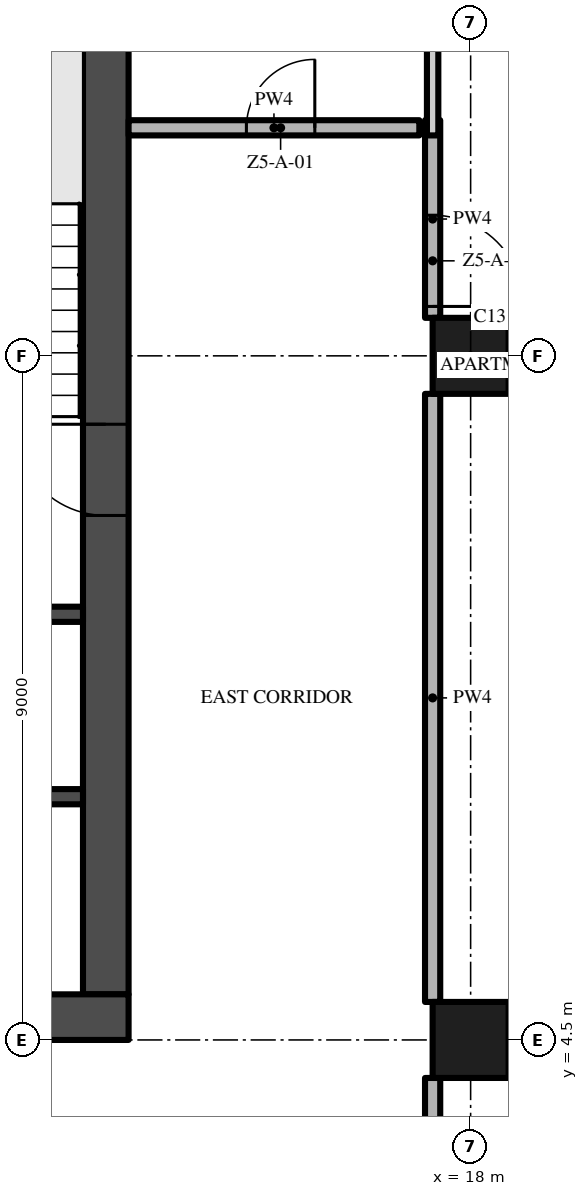
"""IFC4 building model, lengths in metres.
Left out: names, types, materials, properties, quantities, classifications, styles, units other than length and angle.
Written with IfcOpenShell. Run it as: python <this file> out.ifc"""

import sys

from ifc_helpers import new_model, si_unit, direction, frame, frame_2d, origin, origin_2d, place, context, subcontext, project, spatial, rectangle, extrude, element, fill, save


model = new_model("IFC4")
c1 = context("Model", 3, precision=1e-05, world=origin(), true_north=direction((0.0, 1.0)))
c2 = subcontext(c1, "Body", "Model", "MODEL_VIEW")
j1 = project(units=[si_unit("LENGTHUNIT", "METRE"), si_unit("PLANEANGLEUNIT", "RADIAN")], contexts=[c1])
p1 = place(None, origin())
s1 = spatial("IfcSite", under=j1, at=p1, CompositionType="ELEMENT")
p2 = place(p1, origin())
s2 = spatial("IfcBuilding", under=s1, at=p2, CompositionType="ELEMENT")
p3 = place(p2, frame((0.0, 0.0, 246.4)))
s3 = spatial("IfcBuildingStorey", under=s2, at=p3, CompositionType="ELEMENT", Elevation=246.4)
p4 = place(p3, frame((-13.5, 4.8, -0.3), z_axis=(0.0, 0.0, 1.0), x_axis=(1.0, 0.0, 0.0)))
e1 = element("IfcWall", 1, at=p4, inside=s3, PredefinedType="SHEAR", context=c2, shape_type="SweptSolid", body=[
    extrude(rectangle(XDim=27.0, YDim=0.6, at=frame_2d((13.5, 0.0))), origin(), (0.0, 0.0, 1.0), 3.8),
])
p5 = place(p4, frame((12.0, 0.0, 0.3)))
e2 = element("IfcOpeningElement", 2, at=p5, cuts=e1, PredefinedType="OPENING", context=c2, shape_type="SweptSolid", body=[
    extrude(rectangle(XDim=3.0, YDim=2.4, at=frame_2d((1.5, 1.2))), frame((0.0, 0.31, 0.0), z_axis=(0.0, -1.0, 0.0), x_axis=(1.0, 0.0, 0.0)), (0.0, 0.0, 1.0), 0.62),
])
p6 = place(p4, frame((4.9, 0.0, 0.3)))
e3 = element("IfcOpeningElement", 3, at=p6, cuts=e1, PredefinedType="OPENING", context=c2, shape_type="SweptSolid", body=[
    extrude(rectangle(XDim=1.2, YDim=2.2, at=frame_2d((0.6, 1.1))), frame((0.0, 0.31, 0.0), z_axis=(0.0, -1.0, 0.0), x_axis=(1.0, 0.0, 0.0)), (0.0, 0.0, 1.0), 0.62),
])
p7 = place(p4, frame((20.75, 0.0, 0.3)))
e4 = element("IfcOpeningElement", 4, at=p7, cuts=e1, PredefinedType="OPENING", context=c2, shape_type="SweptSolid", body=[
    extrude(rectangle(XDim=1.5, YDim=2.2, at=frame_2d((0.75, 1.1))), frame((0.0, 0.31, 0.0), z_axis=(0.0, -1.0, 0.0), x_axis=(1.0, 0.0, 0.0)), (0.0, 0.0, 1.0), 0.62),
])
p8 = place(p4, frame((17.4, 0.0, 0.3)))
e5 = element("IfcOpeningElement", 5, at=p8, cuts=e1, PredefinedType="OPENING", context=c2, shape_type="SweptSolid", body=[
    extrude(rectangle(XDim=1.2, YDim=2.2, at=frame_2d((0.6, 1.1))), frame((0.0, 0.31, 0.0), z_axis=(0.0, -1.0, 0.0), x_axis=(1.0, 0.0, 0.0)), (0.0, 0.0, 1.0), 0.62),
])
p9 = place(p3, frame((13.2, 5.1, -0.3), z_axis=(0.0, 0.0, 1.0), x_axis=(0.0, 1.0, 0.0)))
e6 = element("IfcWall", 6, at=p9, inside=s3, PredefinedType="SHEAR", context=c2, shape_type="SweptSolid", body=[
    extrude(rectangle(XDim=16.8, YDim=0.6, at=frame_2d((8.4, 0.0))), origin(), (0.0, 0.0, 1.0), 3.8),
])
p10 = place(p9, frame((6.3, 0.0, 0.3)))
e7 = element("IfcOpeningElement", 7, at=p10, cuts=e6, PredefinedType="OPENING", context=c2, shape_type="SweptSolid", body=[
    extrude(rectangle(XDim=1.2, YDim=2.2, at=frame_2d((0.6, 1.1))), frame((0.0, 0.31, 0.0), z_axis=(0.0, -1.0, 0.0), x_axis=(1.0, 0.0, 0.0)), (0.0, 0.0, 1.0), 0.62),
])
for number, where, z_axis, x_axis in (
    (8, (18.0, 13.5, 0.0), (0.0, 0.0, 1.0), (1.0, 0.0, 0.0)),
    (9, (18.0, 4.5, 0.0), (0.0, 0.0, 1.0), (1.0, 0.0, 0.0)),
):
    element("IfcColumn", number, at=place(p3, frame(where, z_axis=z_axis, x_axis=x_axis)), inside=s3, PredefinedType="COLUMN", context=c2, shape_type="SweptSolid", body=[
        extrude(rectangle(XDim=1.0, YDim=1.0, at=origin_2d()), origin(), (0.0, 0.0, 1.0), 3.5),
    ])
for number, where, z_axis, x_axis in (
    (10, (9.65, 7.7, 0.0), (0.0, 0.0, 1.0), (1.0, 0.0, 0.0)),
    (11, (9.65, 10.1, 0.0), (0.0, 0.0, 1.0), (1.0, 0.0, 0.0)),
):
    element("IfcWall", number, at=place(p3, frame(where, z_axis=z_axis, x_axis=x_axis)), inside=s3, PredefinedType="SHEAR", context=c2, shape_type="SweptSolid", body=[
        extrude(rectangle(XDim=3.25, YDim=0.2, at=frame_2d((1.625, 0.0))), origin(), (0.0, 0.0, 1.0), 3.5),
    ])
p11 = place(p3, frame((13.5, 16.5, 0.0), z_axis=(0.0, 0.0, 1.0), x_axis=(1.0, 0.0, 0.0)))
e12 = element("IfcWall", 12, at=p11, inside=s3, PredefinedType="PARTITIONING", context=c2, shape_type="SweptSolid", body=[
    extrude(rectangle(XDim=3.825, YDim=0.2, at=frame_2d((1.913, 0.0))), origin(), (0.0, 0.0, 1.0), 3.5),
])
p12 = place(p11, frame((1.55, 0.0, 0.0)))
e13 = element("IfcOpeningElement", 13, at=p12, cuts=e12, PredefinedType="OPENING", context=c2, shape_type="SweptSolid", body=[
    extrude(rectangle(XDim=0.9, YDim=2.1, at=frame_2d((0.45, 1.05))), frame((0.0, 0.11, 0.0), z_axis=(0.0, -1.0, 0.0), x_axis=(1.0, 0.0, 0.0)), (0.0, 0.0, 1.0), 0.22),
])
p13 = place(p3, frame((17.5, -0.2, 0.0), z_axis=(0.0, 0.0, 1.0), x_axis=(0.0, 1.0, 0.0)))
e14 = element("IfcWall", 14, at=p13, inside=s3, PredefinedType="PARTITIONING", context=c2, shape_type="SweptSolid", body=[
    extrude(rectangle(XDim=4.2, YDim=0.2, at=frame_2d((2.1, 0.0))), origin(), (0.0, 0.0, 1.0), 3.5),
])
p14 = place(p3, frame((17.5, 5.0, 0.0), z_axis=(0.0, 0.0, 1.0), x_axis=(0.0, 1.0, 0.0)))
e15 = element("IfcWall", 15, at=p14, inside=s3, PredefinedType="PARTITIONING", context=c2, shape_type="SweptSolid", body=[
    extrude(rectangle(XDim=8.0, YDim=0.2, at=frame_2d((4.0, 0.0))), origin(), (0.0, 0.0, 1.0), 3.5),
])
p15 = place(p3, frame((17.5, 16.6, 0.0), z_axis=(0.0, 0.0, 1.0), x_axis=(0.0, -1.0, 0.0)))
e16 = element("IfcWall", 16, at=p15, inside=s3, PredefinedType="PARTITIONING", context=c2, shape_type="SweptSolid", body=[
    extrude(rectangle(XDim=2.6, YDim=0.2, at=frame_2d((1.3, 0.0))), origin(), (0.0, 0.0, 1.0), 3.5),
])
p16 = place(p15, frame((1.25, 0.0, 0.0)))
e17 = element("IfcOpeningElement", 17, at=p16, cuts=e16, PredefinedType="OPENING", context=c2, shape_type="SweptSolid", body=[
    extrude(rectangle(XDim=1.2, YDim=2.4, at=frame_2d((0.6, 1.2))), frame((0.0, 0.11, 0.0), z_axis=(0.0, -1.0, 0.0), x_axis=(1.0, 0.0, 0.0)), (0.0, 0.0, 1.0), 0.22),
])
p17 = place(p3, frame((17.5, 16.4, 0.0), z_axis=(0.0, 0.0, 1.0), x_axis=(0.0, 1.0, 0.0)))
e18 = element("IfcWall", 18, at=p17, inside=s3, PredefinedType="PARTITIONING", context=c2, shape_type="SweptSolid", body=[
    extrude(rectangle(XDim=5.2, YDim=0.15, at=frame_2d((2.6, 0.0))), origin(), (0.0, 0.0, 1.0), 3.5),
])
p18 = place(p10, frame((1.2, 0.0, 0.0), z_axis=(0.0, 0.0, 1.0), x_axis=(-1.0, 0.0, 0.0)))
e19 = element("IfcDoor", 19, at=p18, inside=s3, OperationType="SINGLE_SWING_LEFT", PredefinedType="DOOR", context=c2, shape_type="SweptSolid", body=[
    extrude(rectangle(XDim=1.2, YDim=2.2, at=frame_2d((0.6, 1.1))), frame((0.0, 0.025, 0.0), z_axis=(0.0, -1.0, 0.0), x_axis=(1.0, 0.0, 0.0)), (0.0, 0.0, 1.0), 0.05),
])
fill(e7, e19)
p19 = place(p12, origin())
e20 = element("IfcDoor", 20, at=p19, inside=s3, OperationType="SINGLE_SWING_RIGHT", PredefinedType="DOOR", context=c2, shape_type="SweptSolid", body=[
    extrude(rectangle(XDim=0.9, YDim=2.1, at=frame_2d((0.45, 1.05))), frame((0.0, 0.025, 0.0), z_axis=(0.0, -1.0, 0.0), x_axis=(1.0, 0.0, 0.0)), (0.0, 0.0, 1.0), 0.05),
])
fill(e13, e20)
p20 = place(p16, origin())
e21 = element("IfcDoor", 21, at=p20, inside=s3, OperationType="SINGLE_SWING_RIGHT", PredefinedType="DOOR", context=c2, shape_type="SweptSolid", body=[
    extrude(rectangle(XDim=1.2, YDim=2.4, at=frame_2d((0.6, 1.2))), frame((0.0, 0.025, 0.0), z_axis=(0.0, -1.0, 0.0), x_axis=(1.0, 0.0, 0.0)), (0.0, 0.0, 1.0), 0.05),
])
fill(e17, e21)
save(model, sys.argv[1])
